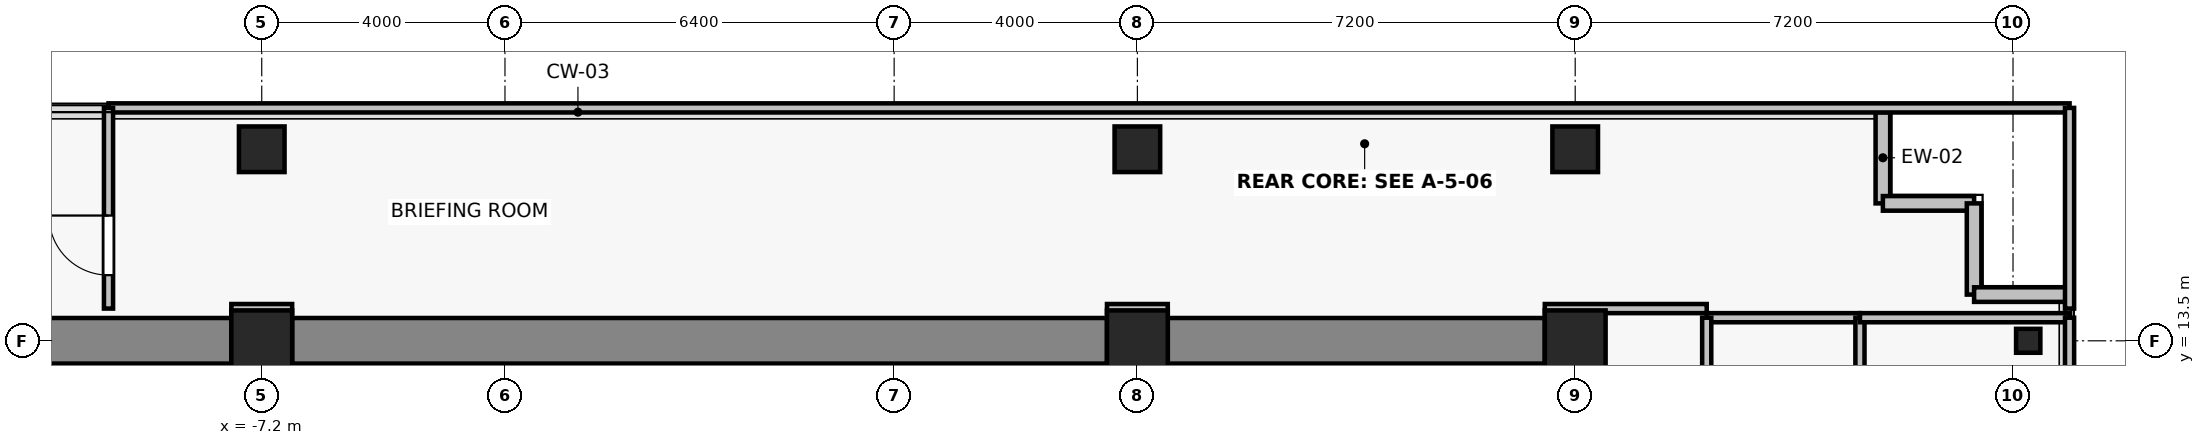
"""IFC4 building model, lengths in metres.
Left out: names, types, materials, properties, quantities, classifications, styles, units other than length and angle.
Written with IfcOpenShell. Run it as: python <this file> out.ifc"""

import sys

from ifc_helpers import new_model, si_unit, direction, frame, frame_2d, origin, origin_2d, place, context, subcontext, project, spatial, rectangle, i_section, extrude, source, transform, mapped, element, fill, save


model = new_model("IFC4")
c1 = context("Model", 3, precision=1e-05, world=origin(), true_north=direction((0.0, 1.0)))
c2 = subcontext(c1, "Body", "Model", "MODEL_VIEW")
j1 = project(units=[si_unit("LENGTHUNIT", "METRE"), si_unit("PLANEANGLEUNIT", "RADIAN")], contexts=[c1])
p1 = place(None, origin())
s1 = spatial("IfcSite", under=j1, at=p1, CompositionType="ELEMENT")
p2 = place(p1, origin())
s2 = spatial("IfcBuilding", under=s1, at=p2, CompositionType="ELEMENT")
p3 = place(p2, frame((0.0, 0.0, 149.5)))
s3 = spatial("IfcBuildingStorey", under=s2, at=p3, CompositionType="ELEMENT", Elevation=149.5)
for number, where, z_axis, x_axis in (
    (1, (-7.2, 13.5, 0.0), (0.0, 0.0, 1.0), (1.0, 0.0, 0.0)),
    (2, (7.2, 13.5, 0.0), (0.0, 0.0, 1.0), (1.0, 0.0, 0.0)),
    (3, (14.4, 13.5, 0.0), (0.0, 0.0, 1.0), (1.0, 0.0, 0.0)),
):
    element("IfcColumn", number, at=place(p3, frame(where, z_axis=z_axis, x_axis=x_axis)), inside=s3, PredefinedType="COLUMN", context=c2, shape_type="SweptSolid", body=[
        extrude(rectangle(XDim=1.0, YDim=1.0, at=origin_2d()), origin(), (0.0, 0.0, 1.0), 3.3),
    ])
for number, where, z_axis, x_axis in (
    (4, (-7.2, 16.65, 0.0), (0.0, 0.0, 1.0), (1.0, 0.0, 0.0)),
    (5, (7.2, 16.65, 0.0), (0.0, 0.0, 1.0), (1.0, 0.0, 0.0)),
    (6, (14.4, 16.65, 0.0), (0.0, 0.0, 1.0), (1.0, 0.0, 0.0)),
):
    element("IfcColumn", number, at=place(p3, frame(where, z_axis=z_axis, x_axis=x_axis)), inside=s3, PredefinedType="COLUMN", context=c2, shape_type="SweptSolid", body=[
        extrude(rectangle(XDim=0.75, YDim=0.75, at=origin_2d()), origin(), (0.0, 0.0, 1.0), 3.3),
    ])
p4 = place(p3, frame((21.85, 13.5, 0.0), z_axis=(0.0, 0.0, 1.0), x_axis=(1.0, 0.0, 0.0)))
e7 = element("IfcColumn", 7, at=p4, inside=s3, PredefinedType="COLUMN", context=c2, shape_type="SweptSolid", body=[
    extrude(i_section(OverallWidth=0.399, OverallDepth=0.394, WebThickness=0.023, FlangeThickness=0.037, FilletRadius=0.015, at=origin_2d()), origin(), (0.0, 0.0, 1.0), 3.3),
])
p5 = place(p3, frame((-13.9, 13.5, 0.0), z_axis=(0.0, 0.0, 1.0), x_axis=(1.0, 0.0, 0.0)))
e8 = element("IfcWall", 8, at=p5, inside=s3, PredefinedType="SHEAR", context=c2, shape_type="SweptSolid", body=[
    extrude(rectangle(XDim=6.2, YDim=0.75, at=frame_2d((3.1, 0.0))), origin(), (0.0, 0.0, 1.0), 3.075),
])
p6 = place(p3, frame((-6.7, 13.5, 0.0), z_axis=(0.0, 0.0, 1.0), x_axis=(1.0, 0.0, 0.0)))
e9 = element("IfcWall", 9, at=p6, inside=s3, PredefinedType="SHEAR", context=c2, shape_type="SweptSolid", body=[
    extrude(rectangle(XDim=13.4, YDim=0.75, at=frame_2d((6.7, 0.0))), origin(), (0.0, 0.0, 1.0), 3.075),
])
p7 = place(p3, frame((7.7, 13.5, 0.0), z_axis=(0.0, 0.0, 1.0), x_axis=(1.0, 0.0, 0.0)))
e10 = element("IfcWall", 10, at=p7, inside=s3, PredefinedType="SHEAR", context=c2, shape_type="SweptSolid", body=[
    extrude(rectangle(XDim=6.2, YDim=0.75, at=frame_2d((3.1, 0.0))), origin(), (0.0, 0.0, 1.0), 3.075),
])
for number, where, z_axis, x_axis in (
    (11, (19.46, 15.76, 0.0), (0.0, 0.0, 1.0), (0.0, 1.0, 0.0)),
    (12, (20.96, 15.76, 0.0), (0.0, 0.0, 1.0), (-1.0, 0.0, 0.0)),
    (13, (20.96, 14.26, 0.0), (0.0, 0.0, 1.0), (0.0, 1.0, 0.0)),
    (14, (22.46, 14.26, 0.0), (0.0, 0.0, 1.0), (-1.0, 0.0, 0.0)),
):
    element("IfcWall", number, at=place(p3, frame(where, z_axis=z_axis, x_axis=x_axis)), inside=s3, PredefinedType="SOLIDWALL", context=c2, shape_type="SweptSolid", body=[
        extrude(rectangle(XDim=1.5, YDim=0.24, at=frame_2d((0.75, 0.0))), origin(), (0.0, 0.0, 1.0), 3.075),
    ])
p8 = place(p3, frame((16.563, 13.88, 0.0), z_axis=(0.0, 0.0, 1.0), x_axis=(1.0, 0.0, 0.0)))
e15 = element("IfcWall", 15, at=p8, inside=s3, PredefinedType="PARTITIONING", context=c2, shape_type="SweptSolid", body=[
    extrude(rectangle(XDim=2.52, YDim=0.15, at=frame_2d((1.26, 0.0))), origin(), (0.0, 0.0, 1.0), 3.075),
])
for number, where, z_axis, x_axis in (
    (16, (16.563, -1.77, 0.0), (0.0, 0.0, 1.0), (0.0, 1.0, 0.0)),
    (17, (19.083, 13.88, 0.0), (0.0, 0.0, 1.0), (0.0, -1.0, 0.0)),
):
    element("IfcWall", number, at=place(p3, frame(where, z_axis=z_axis, x_axis=x_axis)), inside=s3, PredefinedType="PARTITIONING", context=c2, shape_type="SweptSolid", body=[
        extrude(rectangle(XDim=15.65, YDim=0.15, at=frame_2d((7.825, 0.0))), origin(), (0.0, 0.0, 1.0), 2.565),
    ])
p9 = place(p3, frame((19.083, 13.88, 0.0), z_axis=(0.0, 0.0, 1.0), x_axis=(1.0, 0.0, 0.0)))
e18 = element("IfcWall", 18, at=p9, inside=s3, PredefinedType="PARTITIONING", context=c2, shape_type="SweptSolid", body=[
    extrude(rectangle(XDim=3.447, YDim=0.15, at=frame_2d((1.724, 0.0))), origin(), (0.0, 0.0, 1.0), 3.075),
])
p10 = place(p3, frame((22.53, 13.88, 0.0), z_axis=(0.0, 0.0, 1.0), x_axis=(0.0, -1.0, 0.0)))
e19 = element("IfcWall", 19, at=p10, inside=s3, PredefinedType="PARTITIONING", context=c2, shape_type="SweptSolid", body=[
    extrude(rectangle(XDim=15.65, YDim=0.15, at=frame_2d((7.825, 0.0))), origin(), (0.0, 0.0, 1.0), 3.075),
])
for number, where, z_axis, x_axis in (
    (20, (-6.7, 14.03, 0.0), (0.0, 0.0, 1.0), (-1.0, 0.0, 0.0)),
    (21, (7.7, 14.03, 0.0), (0.0, 0.0, 1.0), (-1.0, 0.0, 0.0)),
):
    element("IfcWall", number, at=place(p3, frame(where, z_axis=z_axis, x_axis=x_axis)), inside=s3, PredefinedType="PARTITIONING", context=c2, shape_type="SweptSolid", body=[
        extrude(rectangle(XDim=1.0, YDim=0.15, at=frame_2d((0.5, 0.0))), origin(), (0.0, 0.0, 1.0), 2.565),
    ])
p11 = place(p3, frame((16.563, 14.03, 0.0), z_axis=(0.0, 0.0, 1.0), x_axis=(-1.0, 0.0, 0.0)))
e22 = element("IfcWall", 22, at=p11, inside=s3, PredefinedType="PARTITIONING", context=c2, shape_type="SweptSolid", body=[
    extrude(rectangle(XDim=2.663, YDim=0.15, at=frame_2d((1.332, 0.0))), origin(), (0.0, 0.0, 1.0), 2.565),
])
p12 = place(p3, frame((-9.72, 17.33, 0.0), z_axis=(0.0, 0.0, 1.0), x_axis=(1.0, 0.0, 0.0)))
e23 = element("IfcWall", 23, at=p12, inside=s3, PredefinedType="PARTITIONING", context=c2, shape_type="SweptSolid", body=[
    extrude(rectangle(XDim=32.25, YDim=0.15, at=frame_2d((16.125, 0.0))), origin(), (0.0, 0.0, 1.0), 3.075),
])
p13 = place(p3, frame((-9.72, 14.03, 0.0), z_axis=(0.0, 0.0, 1.0), x_axis=(0.0, 1.0, 0.0)))
e24 = element("IfcWall", 24, at=p13, inside=s3, PredefinedType="PARTITIONING", context=c2, shape_type="SweptSolid", body=[
    extrude(rectangle(XDim=3.3, YDim=0.15, at=frame_2d((1.65, 0.0))), origin(), (0.0, 0.0, 1.0), 2.565),
])
p14 = place(p13, frame((0.55, 0.0, 0.0)))
e25 = element("IfcOpeningElement", 25, at=p14, cuts=e24, PredefinedType="OPENING", context=c2, shape_type="SweptSolid", body=[
    extrude(rectangle(XDim=0.98, YDim=2.15, at=frame_2d((0.49, 1.075))), frame((0.0, 0.085, 0.0), z_axis=(0.0, -1.0, 0.0), x_axis=(1.0, 0.0, 0.0)), (0.0, 0.0, 1.0), 0.17),
])
p15 = place(p3, frame((22.53, 17.33, 0.0), z_axis=(0.0, 0.0, 1.0), x_axis=(0.0, -1.0, 0.0)))
e26 = element("IfcWall", 26, at=p15, inside=s3, PredefinedType="PARTITIONING", context=c2, shape_type="SweptSolid", body=[
    extrude(rectangle(XDim=3.3, YDim=0.15, at=frame_2d((1.65, 0.0))), origin(), (0.0, 0.0, 1.0), 3.075),
])
m1 = source(origin(), c2, "Body", "SweptSolid", [
    extrude(rectangle(XDim=0.98, YDim=2.15, at=frame_2d((0.49, 1.075))), frame((0.0, 0.025, 0.0), z_axis=(0.0, -1.0, 0.0), x_axis=(1.0, 0.0, 0.0)), (0.0, 0.0, 1.0), 0.05),
])
p16 = place(p14, origin())
e27 = element("IfcDoor", 27, at=p16, inside=s3, OperationType="SINGLE_SWING_RIGHT", PredefinedType="DOOR", context=c2, shape_type="MappedRepresentation", body=[
    mapped(m1, transform((0.0, 0.0, 0.0), x_axis=(1.0, 0.0, 0.0), y_axis=(0.0, 1.0, 0.0), z_axis=(0.0, 0.0, 1.0), scale=1.0)),
])
fill(e25, e27)
save(model, sys.argv[1])
